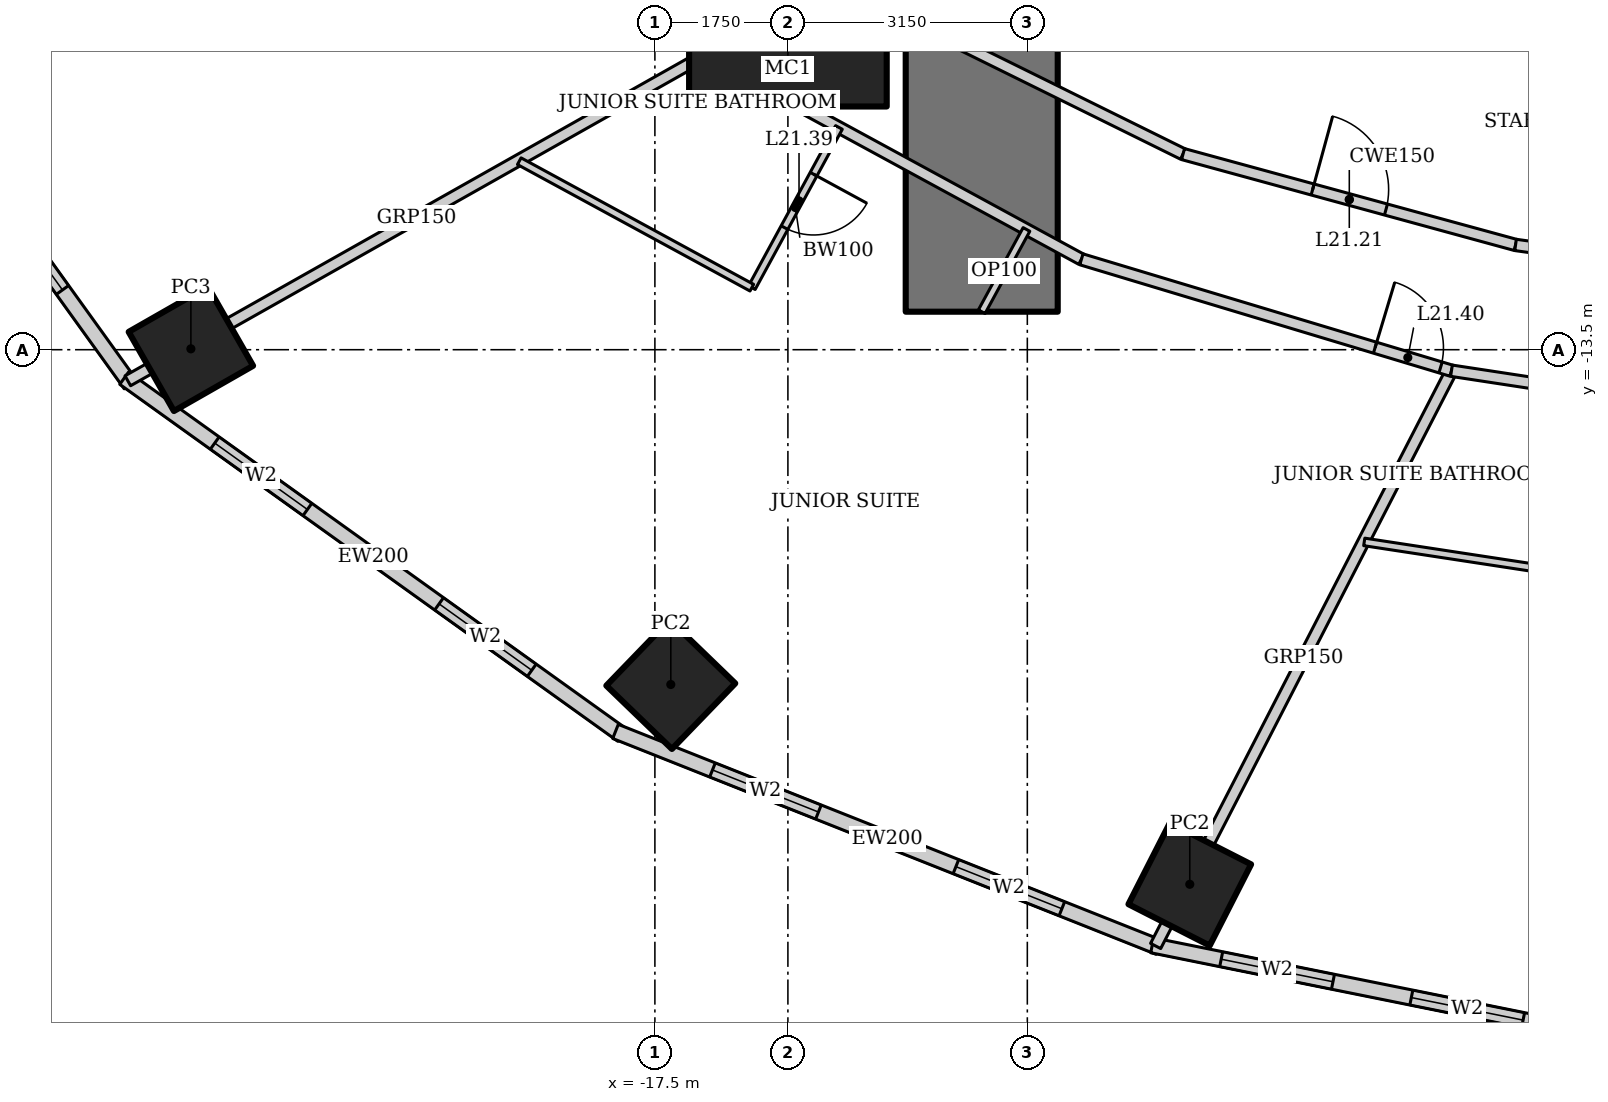
"""IFC4 building model, lengths in metres.
Left out: names, types, materials, properties, quantities, classifications, styles, units other than length and angle.
Written with IfcOpenShell. Run it as: python <this file> out.ifc"""

import sys

from ifc_helpers import new_model, si_unit, direction, frame, frame_2d, origin, origin_2d, place, context, subcontext, project, spatial, rectangle, hollow_rectangle, extrude, element, fill, save


model = new_model("IFC4")
c1 = context("Model", 3, precision=1e-05, world=origin(), true_north=direction((0.0, 1.0)))
c2 = subcontext(c1, "Body", "Model", "MODEL_VIEW")
j1 = project(units=[si_unit("LENGTHUNIT", "METRE"), si_unit("PLANEANGLEUNIT", "RADIAN")], contexts=[c1])
p1 = place(None, origin())
s1 = spatial("IfcSite", under=j1, at=p1, CompositionType="ELEMENT")
p2 = place(p1, origin())
s2 = spatial("IfcBuilding", under=s1, at=p2, CompositionType="ELEMENT")
p3 = place(p2, frame((0.0, 0.0, 91.0)))
s3 = spatial("IfcBuildingStorey", under=s2, at=p3, CompositionType="ELEMENT", Elevation=91.0)
p4 = place(p3, frame((-15.75, -9.0, 0.0), z_axis=(0.0, 0.0, 1.0), x_axis=(1.0, 0.0, 0.0)))
e1 = element("IfcColumn", 1, at=p4, inside=s3, PredefinedType="COLUMN", context=c2, shape_type="SweptSolid", body=[
    extrude(hollow_rectangle(XDim=2.6, YDim=2.6, WallThickness=0.13, at=origin_2d()), origin(), (0.0, 0.0, 1.0), 3.6),
])
p5 = place(p3, frame((-23.605, -13.489, 0.0), z_axis=(0.0, 0.0, 1.0), x_axis=(0.86824298017, 0.496139221777, 0.0)))
e2 = element("IfcColumn", 2, at=p5, inside=s3, PredefinedType="COLUMN", context=c2, shape_type="SweptSolid", body=[
    extrude(hollow_rectangle(XDim=1.2, YDim=1.2, WallThickness=0.12, at=origin_2d()), origin(), (0.0, 0.0, 1.0), 3.6),
])
for number, where, z_axis, x_axis in (
    (3, (-17.291, -17.905, 0.0), (0.0, 0.0, 1.0), (0.695, 0.719, 0.0)),
    (4, (-10.463, -20.534, 0.0), (0.0, 0.0, 1.0), (0.454, 0.891, 0.0)),
):
    element("IfcColumn", number, at=place(p3, frame(where, z_axis=z_axis, x_axis=x_axis)), inside=s3, PredefinedType="COLUMN", context=c2, shape_type="SweptSolid", body=[
        extrude(hollow_rectangle(XDim=1.2, YDim=1.2, WallThickness=0.1, at=origin_2d()), origin(), (0.0, 0.0, 1.0), 3.6),
    ])
p6 = place(p3, frame((-13.2, 13.0, 0.0), z_axis=(0.0, 0.0, 1.0), x_axis=(0.0, -1.0, 0.0)))
e5 = element("IfcWall", 5, at=p6, inside=s3, PredefinedType="SHEAR", context=c2, shape_type="SweptSolid", body=[
    extrude(rectangle(XDim=26.0, YDim=2.0, at=frame_2d((13.0, 0.0))), origin(), (0.0, 0.0, 1.0), 3.6),
])
p7 = place(p6, frame((12.1, 0.0, 0.0)))
e6 = element("IfcOpeningElement", 6, at=p7, cuts=e5, PredefinedType="OPENING", context=c2, shape_type="SweptSolid", body=[
    extrude(rectangle(XDim=1.8, YDim=2.1, at=frame_2d((0.9, 1.05))), frame((0.0, 1.01, 0.0), z_axis=(0.0, -1.0, 0.0), x_axis=(1.0, 0.0, 0.0)), (0.0, 0.0, 1.0), 2.02),
])
p8 = place(p3, frame((-29.26, -7.2, 0.0), z_axis=(0.0, 0.0, 1.0), x_axis=(0.583937613703, -0.811798536155, 0.0)))
e7 = element("IfcWall", 7, at=p8, inside=s3, PredefinedType="SOLIDWALL", context=c2, shape_type="SweptSolid", body=[
    extrude(rectangle(XDim=8.323, YDim=0.2, at=frame_2d((4.162, 0.0))), origin(), (0.0, 0.0, 1.0), 3.45),
])
p9 = place(p8, frame((1.531, 0.0, 0.5)))
e8 = element("IfcOpeningElement", 8, at=p9, cuts=e7, PredefinedType="OPENING", context=c2, shape_type="SweptSolid", body=[
    extrude(rectangle(XDim=1.5, YDim=2.2, at=frame_2d((0.75, 1.1))), frame((0.0, 0.11, 0.0), z_axis=(0.0, -1.0, 0.0), x_axis=(1.0, 0.0, 0.0)), (0.0, 0.0, 1.0), 0.22),
])
p10 = place(p8, frame((5.292, 0.0, 0.5)))
e9 = element("IfcOpeningElement", 9, at=p10, cuts=e7, PredefinedType="OPENING", context=c2, shape_type="SweptSolid", body=[
    extrude(rectangle(XDim=1.5, YDim=2.2, at=frame_2d((0.75, 1.1))), frame((0.0, 0.11, 0.0), z_axis=(0.0, -1.0, 0.0), x_axis=(1.0, 0.0, 0.0)), (0.0, 0.0, 1.0), 0.22),
])
p11 = place(p3, frame((-24.482, -13.875, 0.0), z_axis=(0.0, 0.0, 1.0), x_axis=(0.812791321576, -0.582554948112, 0.0)))
e10 = element("IfcWall", 10, at=p11, inside=s3, PredefinedType="SOLIDWALL", context=c2, shape_type="SweptSolid", body=[
    extrude(rectangle(XDim=8.063, YDim=0.2, at=frame_2d((4.032, 0.0))), origin(), (0.0, 0.0, 1.0), 3.45),
])
p12 = place(p11, frame((1.466, 0.0, 0.5)))
e11 = element("IfcOpeningElement", 11, at=p12, cuts=e10, PredefinedType="OPENING", context=c2, shape_type="SweptSolid", body=[
    extrude(rectangle(XDim=1.5, YDim=2.2, at=frame_2d((0.75, 1.1))), frame((0.0, 0.11, 0.0), z_axis=(0.0, -1.0, 0.0), x_axis=(1.0, 0.0, 0.0)), (0.0, 0.0, 1.0), 0.22),
])
p13 = place(p11, frame((5.097, 0.0, 0.5)))
e12 = element("IfcOpeningElement", 12, at=p13, cuts=e10, PredefinedType="OPENING", context=c2, shape_type="SweptSolid", body=[
    extrude(rectangle(XDim=1.5, YDim=2.2, at=frame_2d((0.75, 1.1))), frame((0.0, 0.11, 0.0), z_axis=(0.0, -1.0, 0.0), x_axis=(1.0, 0.0, 0.0)), (0.0, 0.0, 1.0), 0.22),
])
p14 = place(p3, frame((-18.018, -18.523, 0.0), z_axis=(0.0, 0.0, 1.0), x_axis=(0.929358351251, -0.369178892895, 0.0)))
e13 = element("IfcWall", 13, at=p14, inside=s3, PredefinedType="SOLIDWALL", context=c2, shape_type="SweptSolid", body=[
    extrude(rectangle(XDim=7.692, YDim=0.2, at=frame_2d((3.846, 0.0))), origin(), (0.0, 0.0, 1.0), 3.45),
])
p15 = place(p14, frame((1.373, 0.0, 0.5)))
e14 = element("IfcOpeningElement", 14, at=p15, cuts=e13, PredefinedType="OPENING", context=c2, shape_type="SweptSolid", body=[
    extrude(rectangle(XDim=1.5, YDim=2.2, at=frame_2d((0.75, 1.1))), frame((0.0, 0.11, 0.0), z_axis=(0.0, -1.0, 0.0), x_axis=(1.0, 0.0, 0.0)), (0.0, 0.0, 1.0), 0.22),
])
p16 = place(p14, frame((4.819, 0.0, 0.5)))
e15 = element("IfcOpeningElement", 15, at=p16, cuts=e13, PredefinedType="OPENING", context=c2, shape_type="SweptSolid", body=[
    extrude(rectangle(XDim=1.5, YDim=2.2, at=frame_2d((0.75, 1.1))), frame((0.0, 0.11, 0.0), z_axis=(0.0, -1.0, 0.0), x_axis=(1.0, 0.0, 0.0)), (0.0, 0.0, 1.0), 0.22),
])
p17 = place(p3, frame((-10.957, -21.337, 0.0), z_axis=(0.0, 0.0, 1.0), x_axis=(0.980251657452, -0.197754110105, 0.0)))
e16 = element("IfcWall", 16, at=p17, inside=s3, PredefinedType="SOLIDWALL", context=c2, shape_type="SweptSolid", body=[
    extrude(rectangle(XDim=5.904, YDim=0.2, at=frame_2d((2.952, 0.0))), origin(), (0.0, 0.0, 1.0), 3.45),
])
p18 = place(p17, frame((0.926, 0.0, 0.5)))
e17 = element("IfcOpeningElement", 17, at=p18, cuts=e16, PredefinedType="OPENING", context=c2, shape_type="SweptSolid", body=[
    extrude(rectangle(XDim=1.5, YDim=2.2, at=frame_2d((0.75, 1.1))), frame((0.0, 0.11, 0.0), z_axis=(0.0, -1.0, 0.0), x_axis=(1.0, 0.0, 0.0)), (0.0, 0.0, 1.0), 0.22),
])
p19 = place(p17, frame((3.478, 0.0, 0.5)))
e18 = element("IfcOpeningElement", 18, at=p19, cuts=e16, PredefinedType="OPENING", context=c2, shape_type="SweptSolid", body=[
    extrude(rectangle(XDim=1.5, YDim=2.2, at=frame_2d((0.75, 1.1))), frame((0.0, 0.11, 0.0), z_axis=(0.0, -1.0, 0.0), x_axis=(1.0, 0.0, 0.0)), (0.0, 0.0, 1.0), 0.22),
])
p20 = place(p3, frame((-24.435, -13.909, 0.0), z_axis=(0.0, 0.0, 1.0), x_axis=(0.87090601027, 0.491449612143, 0.0)))
e19 = element("IfcWall", 19, at=p20, inside=s3, PredefinedType="PARTITIONING", context=c2, shape_type="SweptSolid", body=[
    extrude(rectangle(XDim=8.726, YDim=0.15, at=frame_2d((4.363, 0.0))), origin(), (0.0, 0.0, 1.0), 2.693),
])
p21 = place(p3, frame((-10.912, -21.346, 0.0), z_axis=(0.0, 0.0, 1.0), x_axis=(0.457327273085, 0.889298468059, 0.0)))
e20 = element("IfcWall", 20, at=p21, inside=s3, PredefinedType="PARTITIONING", context=c2, shape_type="SweptSolid", body=[
    extrude(rectangle(XDim=8.511, YDim=0.15, at=frame_2d((4.256, 0.0))), origin(), (0.0, 0.0, 1.0), 2.528),
])
p22 = place(p3, frame((-20.984, -5.232, 0.0), z_axis=(0.0, 0.0, 1.0), x_axis=(0.687062608696, -0.726598218916, 0.0)))
e21 = element("IfcWall", 21, at=p22, inside=s3, PredefinedType="PARTITIONING", context=c2, shape_type="SweptSolid", body=[
    extrude(rectangle(XDim=6.039, YDim=0.15, at=frame_2d((3.02, 0.0))), origin(), (0.0, 0.0, 1.0), 3.45),
])
p23 = place(p22, frame((0.15, 0.0, 0.0)))
e22 = element("IfcOpeningElement", 22, at=p23, cuts=e21, PredefinedType="OPENING", context=c2, shape_type="SweptSolid", body=[
    extrude(rectangle(XDim=0.9, YDim=2.1, at=frame_2d((0.45, 1.05))), frame((0.0, 0.085, 0.0), z_axis=(0.0, -1.0, 0.0), x_axis=(1.0, 0.0, 0.0)), (0.0, 0.0, 1.0), 0.17),
])
p24 = place(p3, frame((-16.835, -9.62, 0.0), z_axis=(0.0, 0.0, 1.0), x_axis=(0.878450059298, -0.477834169267, 0.0)))
e23 = element("IfcWall", 23, at=p24, inside=s3, PredefinedType="PARTITIONING", context=c2, shape_type="SweptSolid", body=[
    extrude(rectangle(XDim=5.631, YDim=0.15, at=frame_2d((2.815, 0.0))), origin(), (0.0, 0.0, 1.0), 3.45),
])
p25 = place(p3, frame((-11.888, -12.311, 0.0), z_axis=(0.0, 0.0, 1.0), x_axis=(0.957564241242, -0.288219922793, 0.0)))
e24 = element("IfcWall", 24, at=p25, inside=s3, PredefinedType="PARTITIONING", context=c2, shape_type="SweptSolid", body=[
    extrude(rectangle(XDim=5.085, YDim=0.15, at=frame_2d((2.542, 0.0))), origin(), (0.0, 0.0, 1.0), 3.45),
])
p26 = place(p25, frame((4.035, 0.0, 0.0)))
e25 = element("IfcOpeningElement", 25, at=p26, cuts=e24, PredefinedType="OPENING", context=c2, shape_type="SweptSolid", body=[
    extrude(rectangle(XDim=0.9, YDim=2.1, at=frame_2d((0.45, 1.05))), frame((0.0, 0.085, 0.0), z_axis=(0.0, -1.0, 0.0), x_axis=(1.0, 0.0, 0.0)), (0.0, 0.0, 1.0), 0.17),
])
p27 = place(p3, frame((-7.019, -13.776, 0.0), z_axis=(0.0, 0.0, 1.0), x_axis=(0.988564270062, -0.150800145746, 0.0)))
e26 = element("IfcWall", 26, at=p27, inside=s3, PredefinedType="PARTITIONING", context=c2, shape_type="SweptSolid", body=[
    extrude(rectangle(XDim=3.751, YDim=0.15, at=frame_2d((1.875, 0.0))), origin(), (0.0, 0.0, 1.0), 3.45),
])
p28 = place(p3, frame((-15.147, -8.656, 0.0), z_axis=(0.0, 0.0, 1.0), x_axis=(0.89656943448, -0.442903205177, 0.0)))
e27 = element("IfcWall", 27, at=p28, inside=s3, PredefinedType="PARTITIONING", context=c2, shape_type="SweptSolid", body=[
    extrude(rectangle(XDim=5.126, YDim=0.15, at=frame_2d((2.563, 0.0))), origin(), (0.0, 0.0, 1.0), 3.45),
])
p29 = place(p3, frame((-10.551, -10.926, 0.0), z_axis=(0.0, 0.0, 1.0), x_axis=(0.964644466646, -0.263554648923, 0.0)))
e28 = element("IfcWall", 28, at=p29, inside=s3, PredefinedType="PARTITIONING", context=c2, shape_type="SweptSolid", body=[
    extrude(rectangle(XDim=4.535, YDim=0.15, at=frame_2d((2.268, 0.0))), origin(), (0.0, 0.0, 1.0), 3.45),
])
p30 = place(p29, frame((1.768, 0.0, 0.0)))
e29 = element("IfcOpeningElement", 29, at=p30, cuts=e28, PredefinedType="OPENING", context=c2, shape_type="SweptSolid", body=[
    extrude(rectangle(XDim=1.0, YDim=2.1, at=frame_2d((0.5, 1.05))), frame((0.0, 0.085, 0.0), z_axis=(0.0, -1.0, 0.0), x_axis=(1.0, 0.0, 0.0)), (0.0, 0.0, 1.0), 0.17),
])
p31 = place(p3, frame((-6.176, -12.122, 0.0), z_axis=(0.0, 0.0, 1.0), x_axis=(0.990563451353, -0.137054911782, 0.0)))
e30 = element("IfcWall", 30, at=p31, inside=s3, PredefinedType="PARTITIONING", context=c2, shape_type="SweptSolid", body=[
    extrude(rectangle(XDim=3.304, YDim=0.15, at=frame_2d((1.652, 0.0))), origin(), (0.0, 0.0, 1.0), 3.45),
])
p32 = place(p3, frame((-15.078, -10.576, 0.0), z_axis=(0.0, 0.0, 1.0), x_axis=(-0.477832549678, -0.878450940274, 0.0)))
e31 = element("IfcWall", 31, at=p32, inside=s3, PredefinedType="PARTITIONING", context=c2, shape_type="SweptSolid", body=[
    extrude(rectangle(XDim=2.4, YDim=0.1, at=frame_2d((1.2, 0.0))), origin(), (0.0, 0.0, 1.0), 3.45),
])
p33 = place(p32, frame((0.7, 0.0, 0.0)))
e32 = element("IfcOpeningElement", 32, at=p33, cuts=e31, PredefinedType="OPENING", context=c2, shape_type="SweptSolid", body=[
    extrude(rectangle(XDim=0.8, YDim=2.1, at=frame_2d((0.4, 1.05))), frame((0.0, 0.06, 0.0), z_axis=(0.0, -1.0, 0.0), x_axis=(1.0, 0.0, 0.0)), (0.0, 0.0, 1.0), 0.12),
])
p34 = place(p3, frame((-16.225, -12.684, 0.0), z_axis=(0.0, 0.0, 1.0), x_axis=(-0.878473578893, 0.477790928322, 0.0)))
e33 = element("IfcWall", 33, at=p34, inside=s3, PredefinedType="PARTITIONING", context=c2, shape_type="SweptSolid", body=[
    extrude(rectangle(XDim=3.483, YDim=0.1, at=frame_2d((1.741, 0.0))), origin(), (0.0, 0.0, 1.0), 3.45),
])
p35 = place(p3, frame((-5.404, -16.45, 0.0), z_axis=(0.0, 0.0, 1.0), x_axis=(-0.988568792086, 0.150770498819, 0.0)))
e34 = element("IfcWall", 34, at=p35, inside=s3, PredefinedType="PARTITIONING", context=c2, shape_type="SweptSolid", body=[
    extrude(rectangle(XDim=2.795, YDim=0.1, at=frame_2d((1.397, 0.0))), origin(), (0.0, 0.0, 1.0), 3.45),
])
p36 = place(p3, frame((-13.2, -13.0, 0.0), z_axis=(0.0, 0.0, 1.0), x_axis=(0.477852414256, 0.878440134665, 0.0)))
e35 = element("IfcWall", 35, at=p36, inside=s3, PredefinedType="PARTITIONING", context=c2, shape_type="SweptSolid", body=[
    extrude(rectangle(XDim=1.232, YDim=0.1, at=frame_2d((0.616, 0.0))), origin(), (0.0, 0.0, 1.0), 3.45),
])
p37 = place(p10, origin())
e36 = element("IfcWindow", 36, at=p37, inside=s3, PartitioningType="SINGLE_PANEL", PredefinedType="WINDOW", context=c2, shape_type="SweptSolid", body=[
    extrude(rectangle(XDim=1.5, YDim=2.2, at=frame_2d((0.75, 1.1))), frame((0.0, 0.03, 0.0), z_axis=(0.0, -1.0, 0.0), x_axis=(1.0, 0.0, 0.0)), (0.0, 0.0, 1.0), 0.06),
])
fill(e9, e36)
p38 = place(p12, origin())
e37 = element("IfcWindow", 37, at=p38, inside=s3, PartitioningType="SINGLE_PANEL", PredefinedType="WINDOW", context=c2, shape_type="SweptSolid", body=[
    extrude(rectangle(XDim=1.5, YDim=2.2, at=frame_2d((0.75, 1.1))), frame((0.0, 0.03, 0.0), z_axis=(0.0, -1.0, 0.0), x_axis=(1.0, 0.0, 0.0)), (0.0, 0.0, 1.0), 0.06),
])
fill(e11, e37)
p39 = place(p13, origin())
e38 = element("IfcWindow", 38, at=p39, inside=s3, PartitioningType="SINGLE_PANEL", PredefinedType="WINDOW", context=c2, shape_type="SweptSolid", body=[
    extrude(rectangle(XDim=1.5, YDim=2.2, at=frame_2d((0.75, 1.1))), frame((0.0, 0.03, 0.0), z_axis=(0.0, -1.0, 0.0), x_axis=(1.0, 0.0, 0.0)), (0.0, 0.0, 1.0), 0.06),
])
fill(e12, e38)
p40 = place(p15, origin())
e39 = element("IfcWindow", 39, at=p40, inside=s3, PartitioningType="SINGLE_PANEL", PredefinedType="WINDOW", context=c2, shape_type="SweptSolid", body=[
    extrude(rectangle(XDim=1.5, YDim=2.2, at=frame_2d((0.75, 1.1))), frame((0.0, 0.03, 0.0), z_axis=(0.0, -1.0, 0.0), x_axis=(1.0, 0.0, 0.0)), (0.0, 0.0, 1.0), 0.06),
])
fill(e14, e39)
p41 = place(p16, origin())
e40 = element("IfcWindow", 40, at=p41, inside=s3, PartitioningType="SINGLE_PANEL", PredefinedType="WINDOW", context=c2, shape_type="SweptSolid", body=[
    extrude(rectangle(XDim=1.5, YDim=2.2, at=frame_2d((0.75, 1.1))), frame((0.0, 0.03, 0.0), z_axis=(0.0, -1.0, 0.0), x_axis=(1.0, 0.0, 0.0)), (0.0, 0.0, 1.0), 0.06),
])
fill(e15, e40)
p42 = place(p18, origin())
e41 = element("IfcWindow", 41, at=p42, inside=s3, PartitioningType="SINGLE_PANEL", PredefinedType="WINDOW", context=c2, shape_type="SweptSolid", body=[
    extrude(rectangle(XDim=1.5, YDim=2.2, at=frame_2d((0.75, 1.1))), frame((0.0, 0.03, 0.0), z_axis=(0.0, -1.0, 0.0), x_axis=(1.0, 0.0, 0.0)), (0.0, 0.0, 1.0), 0.06),
])
fill(e17, e41)
p43 = place(p19, origin())
e42 = element("IfcWindow", 42, at=p43, inside=s3, PartitioningType="SINGLE_PANEL", PredefinedType="WINDOW", context=c2, shape_type="SweptSolid", body=[
    extrude(rectangle(XDim=1.5, YDim=2.2, at=frame_2d((0.75, 1.1))), frame((0.0, 0.03, 0.0), z_axis=(0.0, -1.0, 0.0), x_axis=(1.0, 0.0, 0.0)), (0.0, 0.0, 1.0), 0.06),
])
fill(e18, e42)
p44 = place(p30, origin())
e43 = element("IfcDoor", 43, at=p44, inside=s3, OperationType="SINGLE_SWING_LEFT", PredefinedType="DOOR", context=c2, shape_type="SweptSolid", body=[
    extrude(rectangle(XDim=1.0, YDim=2.1, at=frame_2d((0.5, 1.05))), frame((0.0, 0.025, 0.0), z_axis=(0.0, -1.0, 0.0), x_axis=(1.0, 0.0, 0.0)), (0.0, 0.0, 1.0), 0.05),
])
fill(e29, e43)
p45 = place(p33, origin())
e44 = element("IfcDoor", 44, at=p45, inside=s3, OperationType="SINGLE_SWING_LEFT", PredefinedType="DOOR", context=c2, shape_type="SweptSolid", body=[
    extrude(rectangle(XDim=0.8, YDim=2.1, at=frame_2d((0.4, 1.05))), frame((0.0, 0.025, 0.0), z_axis=(0.0, -1.0, 0.0), x_axis=(1.0, 0.0, 0.0)), (0.0, 0.0, 1.0), 0.05),
])
fill(e32, e44)
p46 = place(p26, origin())
e45 = element("IfcDoor", 45, at=p46, inside=s3, OperationType="SINGLE_SWING_LEFT", PredefinedType="DOOR", context=c2, shape_type="SweptSolid", body=[
    extrude(rectangle(XDim=0.9, YDim=2.1, at=frame_2d((0.45, 1.05))), frame((0.0, 0.025, 0.0), z_axis=(0.0, -1.0, 0.0), x_axis=(1.0, 0.0, 0.0)), (0.0, 0.0, 1.0), 0.05),
])
fill(e25, e45)
save(model, sys.argv[1])
